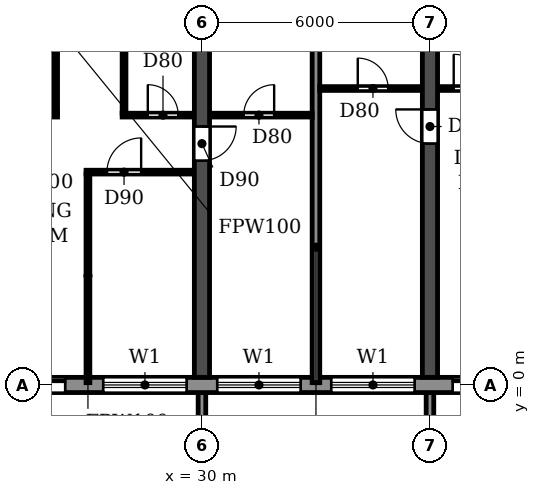
"""IFC4 building model, lengths in metres.
Left out: names, types, materials, properties, quantities, classifications, styles, units other than length and angle.
Written with IfcOpenShell. Run it as: python <this file> out.ifc"""

import sys

from ifc_helpers import new_model, si_unit, direction, frame, frame_2d, origin, place, context, subcontext, project, spatial, polyline, rectangle, outline, extrude, source, transform, mapped, element, fill, save


model = new_model("IFC4")
c1 = context("Model", 3, precision=1e-05, world=origin(), true_north=direction((0.0, 1.0)))
c2 = subcontext(c1, "Body", "Model", "MODEL_VIEW")
j1 = project(units=[si_unit("LENGTHUNIT", "METRE"), si_unit("PLANEANGLEUNIT", "RADIAN")], contexts=[c1])
p1 = place(None, origin())
s1 = spatial("IfcSite", under=j1, at=p1, CompositionType="ELEMENT")
p2 = place(p1, origin())
s2 = spatial("IfcBuilding", under=s1, at=p2, CompositionType="ELEMENT")
p3 = place(p2, frame((0.0, 0.0, 23.4)))
s3 = spatial("IfcBuildingStorey", under=s2, at=p3, CompositionType="ELEMENT", Elevation=23.4)
p4 = place(p3, frame((30.0, 0.2, 0.0), z_axis=(0.0, 0.0, 1.0), x_axis=(0.0, 1.0, 0.0)))
e1 = element("IfcWall", 1, at=p4, inside=s3, PredefinedType="SHEAR", context=c2, shape_type="SweptSolid", body=[
    extrude(rectangle(XDim=11.65, YDim=0.4, at=frame_2d((5.825, 0.0))), origin(), (0.0, 0.0, 1.0), 3.05),
])
p5 = place(p4, frame((5.7, 0.0, 0.0)))
e2 = element("IfcOpeningElement", 2, at=p5, cuts=e1, PredefinedType="OPENING", context=c2, shape_type="SweptSolid", body=[
    extrude(rectangle(XDim=0.9, YDim=2.1, at=frame_2d((0.45, 1.05))), frame((0.0, 0.21, 0.0), z_axis=(0.0, -1.0, 0.0), x_axis=(1.0, 0.0, 0.0)), (0.0, 0.0, 1.0), 0.42),
])
p6 = place(p3, frame((36.0, 0.2, 0.0), z_axis=(0.0, 0.0, 1.0), x_axis=(0.0, 1.0, 0.0)))
e3 = element("IfcWall", 3, at=p6, inside=s3, PredefinedType="SHEAR", context=c2, shape_type="SweptSolid", body=[
    extrude(rectangle(XDim=11.65, YDim=0.4, at=frame_2d((5.825, 0.0))), origin(), (0.0, 0.0, 1.0), 3.05),
])
p7 = place(p6, frame((6.15, 0.0, 0.0)))
e4 = element("IfcOpeningElement", 4, at=p7, cuts=e3, PredefinedType="OPENING", context=c2, shape_type="SweptSolid", body=[
    extrude(rectangle(XDim=0.9, YDim=2.1, at=frame_2d((0.45, 1.05))), frame((0.0, 0.21, 0.0), z_axis=(0.0, -1.0, 0.0), x_axis=(1.0, 0.0, 0.0)), (0.0, 0.0, 1.0), 0.42),
])
p8 = place(p3, frame((4.683, 0.0, 0.0), z_axis=(0.0, 0.0, 1.0), x_axis=(1.0, 0.0, 0.0)))
e5 = element("IfcWall", 5, at=p8, inside=s3, PredefinedType="STANDARD", context=c2, shape_type="SweptSolid", body=[
    extrude(rectangle(XDim=92.634, YDim=0.4, at=frame_2d((46.317, 0.0))), origin(), (0.0, 0.0, 1.0), 3.05),
])
p9 = place(p8, frame((1.717, 0.0, 0.9)))
e6 = element("IfcOpeningElement", 6, at=p9, cuts=e5, PredefinedType="OPENING", context=c2, shape_type="SweptSolid", body=[
    extrude(rectangle(XDim=2.2, YDim=1.5, at=frame_2d((1.1, 0.75))), frame((0.0, 0.21, 0.0), z_axis=(0.0, -1.0, 0.0), x_axis=(1.0, 0.0, 0.0)), (0.0, 0.0, 1.0), 0.42),
])
p10 = place(p8, frame((4.717, 0.0, 0.9)))
e7 = element("IfcOpeningElement", 7, at=p10, cuts=e5, PredefinedType="OPENING", context=c2, shape_type="SweptSolid", body=[
    extrude(rectangle(XDim=2.2, YDim=1.5, at=frame_2d((1.1, 0.75))), frame((0.0, 0.21, 0.0), z_axis=(0.0, -1.0, 0.0), x_axis=(1.0, 0.0, 0.0)), (0.0, 0.0, 1.0), 0.42),
])
p11 = place(p8, frame((7.717, 0.0, 0.9)))
e8 = element("IfcOpeningElement", 8, at=p11, cuts=e5, PredefinedType="OPENING", context=c2, shape_type="SweptSolid", body=[
    extrude(rectangle(XDim=2.2, YDim=1.5, at=frame_2d((1.1, 0.75))), frame((0.0, 0.21, 0.0), z_axis=(0.0, -1.0, 0.0), x_axis=(1.0, 0.0, 0.0)), (0.0, 0.0, 1.0), 0.42),
])
p12 = place(p8, frame((10.717, 0.0, 0.9)))
e9 = element("IfcOpeningElement", 9, at=p12, cuts=e5, PredefinedType="OPENING", context=c2, shape_type="SweptSolid", body=[
    extrude(rectangle(XDim=2.2, YDim=1.5, at=frame_2d((1.1, 0.75))), frame((0.0, 0.21, 0.0), z_axis=(0.0, -1.0, 0.0), x_axis=(1.0, 0.0, 0.0)), (0.0, 0.0, 1.0), 0.42),
])
p13 = place(p8, frame((13.717, 0.0, 0.9)))
e10 = element("IfcOpeningElement", 10, at=p13, cuts=e5, PredefinedType="OPENING", context=c2, shape_type="SweptSolid", body=[
    extrude(rectangle(XDim=2.2, YDim=1.5, at=frame_2d((1.1, 0.75))), frame((0.0, 0.21, 0.0), z_axis=(0.0, -1.0, 0.0), x_axis=(1.0, 0.0, 0.0)), (0.0, 0.0, 1.0), 0.42),
])
p14 = place(p8, frame((16.717, 0.0, 0.9)))
e11 = element("IfcOpeningElement", 11, at=p14, cuts=e5, PredefinedType="OPENING", context=c2, shape_type="SweptSolid", body=[
    extrude(rectangle(XDim=2.2, YDim=1.5, at=frame_2d((1.1, 0.75))), frame((0.0, 0.21, 0.0), z_axis=(0.0, -1.0, 0.0), x_axis=(1.0, 0.0, 0.0)), (0.0, 0.0, 1.0), 0.42),
])
p15 = place(p8, frame((19.917, 0.0, 0.0)))
e12 = element("IfcOpeningElement", 12, at=p15, cuts=e5, PredefinedType="OPENING", context=c2, shape_type="SweptSolid", body=[
    extrude(rectangle(XDim=1.8, YDim=2.4, at=frame_2d((0.9, 1.2))), frame((0.0, 0.21, 0.0), z_axis=(0.0, -1.0, 0.0), x_axis=(1.0, 0.0, 0.0)), (0.0, 0.0, 1.0), 0.42),
])
p16 = place(p8, frame((22.717, 0.0, 0.9)))
e13 = element("IfcOpeningElement", 13, at=p16, cuts=e5, PredefinedType="OPENING", context=c2, shape_type="SweptSolid", body=[
    extrude(rectangle(XDim=2.2, YDim=1.5, at=frame_2d((1.1, 0.75))), frame((0.0, 0.21, 0.0), z_axis=(0.0, -1.0, 0.0), x_axis=(1.0, 0.0, 0.0)), (0.0, 0.0, 1.0), 0.42),
])
p17 = place(p8, frame((25.717, 0.0, 0.9)))
e14 = element("IfcOpeningElement", 14, at=p17, cuts=e5, PredefinedType="OPENING", context=c2, shape_type="SweptSolid", body=[
    extrude(rectangle(XDim=2.2, YDim=1.5, at=frame_2d((1.1, 0.75))), frame((0.0, 0.21, 0.0), z_axis=(0.0, -1.0, 0.0), x_axis=(1.0, 0.0, 0.0)), (0.0, 0.0, 1.0), 0.42),
])
p18 = place(p8, frame((28.717, 0.0, 0.9)))
e15 = element("IfcOpeningElement", 15, at=p18, cuts=e5, PredefinedType="OPENING", context=c2, shape_type="SweptSolid", body=[
    extrude(rectangle(XDim=2.2, YDim=1.5, at=frame_2d((1.1, 0.75))), frame((0.0, 0.21, 0.0), z_axis=(0.0, -1.0, 0.0), x_axis=(1.0, 0.0, 0.0)), (0.0, 0.0, 1.0), 0.42),
])
p19 = place(p8, frame((31.917, 0.0, 0.0)))
e16 = element("IfcOpeningElement", 16, at=p19, cuts=e5, PredefinedType="OPENING", context=c2, shape_type="SweptSolid", body=[
    extrude(rectangle(XDim=1.8, YDim=2.4, at=frame_2d((0.9, 1.2))), frame((0.0, 0.21, 0.0), z_axis=(0.0, -1.0, 0.0), x_axis=(1.0, 0.0, 0.0)), (0.0, 0.0, 1.0), 0.42),
])
p20 = place(p8, frame((34.717, 0.0, 0.9)))
e17 = element("IfcOpeningElement", 17, at=p20, cuts=e5, PredefinedType="OPENING", context=c2, shape_type="SweptSolid", body=[
    extrude(rectangle(XDim=2.2, YDim=1.5, at=frame_2d((1.1, 0.75))), frame((0.0, 0.21, 0.0), z_axis=(0.0, -1.0, 0.0), x_axis=(1.0, 0.0, 0.0)), (0.0, 0.0, 1.0), 0.42),
])
p21 = place(p8, frame((37.717, 0.0, 0.9)))
e18 = element("IfcOpeningElement", 18, at=p21, cuts=e5, PredefinedType="OPENING", context=c2, shape_type="SweptSolid", body=[
    extrude(rectangle(XDim=2.2, YDim=1.5, at=frame_2d((1.1, 0.75))), frame((0.0, 0.21, 0.0), z_axis=(0.0, -1.0, 0.0), x_axis=(1.0, 0.0, 0.0)), (0.0, 0.0, 1.0), 0.42),
])
p22 = place(p8, frame((40.717, 0.0, 0.9)))
e19 = element("IfcOpeningElement", 19, at=p22, cuts=e5, PredefinedType="OPENING", context=c2, shape_type="SweptSolid", body=[
    extrude(rectangle(XDim=2.2, YDim=1.5, at=frame_2d((1.1, 0.75))), frame((0.0, 0.21, 0.0), z_axis=(0.0, -1.0, 0.0), x_axis=(1.0, 0.0, 0.0)), (0.0, 0.0, 1.0), 0.42),
])
p23 = place(p8, frame((43.917, 0.0, 0.0)))
e20 = element("IfcOpeningElement", 20, at=p23, cuts=e5, PredefinedType="OPENING", context=c2, shape_type="SweptSolid", body=[
    extrude(rectangle(XDim=1.8, YDim=2.4, at=frame_2d((0.9, 1.2))), frame((0.0, 0.21, 0.0), z_axis=(0.0, -1.0, 0.0), x_axis=(1.0, 0.0, 0.0)), (0.0, 0.0, 1.0), 0.42),
])
p24 = place(p8, frame((46.717, 0.0, 0.9)))
e21 = element("IfcOpeningElement", 21, at=p24, cuts=e5, PredefinedType="OPENING", context=c2, shape_type="SweptSolid", body=[
    extrude(rectangle(XDim=2.2, YDim=1.5, at=frame_2d((1.1, 0.75))), frame((0.0, 0.21, 0.0), z_axis=(0.0, -1.0, 0.0), x_axis=(1.0, 0.0, 0.0)), (0.0, 0.0, 1.0), 0.42),
])
p25 = place(p8, frame((49.717, 0.0, 0.9)))
e22 = element("IfcOpeningElement", 22, at=p25, cuts=e5, PredefinedType="OPENING", context=c2, shape_type="SweptSolid", body=[
    extrude(rectangle(XDim=2.2, YDim=1.5, at=frame_2d((1.1, 0.75))), frame((0.0, 0.21, 0.0), z_axis=(0.0, -1.0, 0.0), x_axis=(1.0, 0.0, 0.0)), (0.0, 0.0, 1.0), 0.42),
])
p26 = place(p8, frame((52.717, 0.0, 0.9)))
e23 = element("IfcOpeningElement", 23, at=p26, cuts=e5, PredefinedType="OPENING", context=c2, shape_type="SweptSolid", body=[
    extrude(rectangle(XDim=2.2, YDim=1.5, at=frame_2d((1.1, 0.75))), frame((0.0, 0.21, 0.0), z_axis=(0.0, -1.0, 0.0), x_axis=(1.0, 0.0, 0.0)), (0.0, 0.0, 1.0), 0.42),
])
p27 = place(p8, frame((55.717, 0.0, 0.9)))
e24 = element("IfcOpeningElement", 24, at=p27, cuts=e5, PredefinedType="OPENING", context=c2, shape_type="SweptSolid", body=[
    extrude(rectangle(XDim=2.2, YDim=1.5, at=frame_2d((1.1, 0.75))), frame((0.0, 0.21, 0.0), z_axis=(0.0, -1.0, 0.0), x_axis=(1.0, 0.0, 0.0)), (0.0, 0.0, 1.0), 0.42),
])
p28 = place(p8, frame((58.917, 0.0, 0.0)))
e25 = element("IfcOpeningElement", 25, at=p28, cuts=e5, PredefinedType="OPENING", context=c2, shape_type="SweptSolid", body=[
    extrude(rectangle(XDim=1.8, YDim=2.4, at=frame_2d((0.9, 1.2))), frame((0.0, 0.21, 0.0), z_axis=(0.0, -1.0, 0.0), x_axis=(1.0, 0.0, 0.0)), (0.0, 0.0, 1.0), 0.42),
])
p29 = place(p8, frame((61.717, 0.0, 0.9)))
e26 = element("IfcOpeningElement", 26, at=p29, cuts=e5, PredefinedType="OPENING", context=c2, shape_type="SweptSolid", body=[
    extrude(rectangle(XDim=2.2, YDim=1.5, at=frame_2d((1.1, 0.75))), frame((0.0, 0.21, 0.0), z_axis=(0.0, -1.0, 0.0), x_axis=(1.0, 0.0, 0.0)), (0.0, 0.0, 1.0), 0.42),
])
p30 = place(p8, frame((64.717, 0.0, 0.9)))
e27 = element("IfcOpeningElement", 27, at=p30, cuts=e5, PredefinedType="OPENING", context=c2, shape_type="SweptSolid", body=[
    extrude(rectangle(XDim=2.2, YDim=1.5, at=frame_2d((1.1, 0.75))), frame((0.0, 0.21, 0.0), z_axis=(0.0, -1.0, 0.0), x_axis=(1.0, 0.0, 0.0)), (0.0, 0.0, 1.0), 0.42),
])
p31 = place(p8, frame((67.717, 0.0, 0.9)))
e28 = element("IfcOpeningElement", 28, at=p31, cuts=e5, PredefinedType="OPENING", context=c2, shape_type="SweptSolid", body=[
    extrude(rectangle(XDim=2.2, YDim=1.5, at=frame_2d((1.1, 0.75))), frame((0.0, 0.21, 0.0), z_axis=(0.0, -1.0, 0.0), x_axis=(1.0, 0.0, 0.0)), (0.0, 0.0, 1.0), 0.42),
])
p32 = place(p8, frame((70.917, 0.0, 0.0)))
e29 = element("IfcOpeningElement", 29, at=p32, cuts=e5, PredefinedType="OPENING", context=c2, shape_type="SweptSolid", body=[
    extrude(rectangle(XDim=1.8, YDim=2.4, at=frame_2d((0.9, 1.2))), frame((0.0, 0.21, 0.0), z_axis=(0.0, -1.0, 0.0), x_axis=(1.0, 0.0, 0.0)), (0.0, 0.0, 1.0), 0.42),
])
p33 = place(p8, frame((73.717, 0.0, 0.9)))
e30 = element("IfcOpeningElement", 30, at=p33, cuts=e5, PredefinedType="OPENING", context=c2, shape_type="SweptSolid", body=[
    extrude(rectangle(XDim=2.2, YDim=1.5, at=frame_2d((1.1, 0.75))), frame((0.0, 0.21, 0.0), z_axis=(0.0, -1.0, 0.0), x_axis=(1.0, 0.0, 0.0)), (0.0, 0.0, 1.0), 0.42),
])
p34 = place(p8, frame((76.717, 0.0, 0.9)))
e31 = element("IfcOpeningElement", 31, at=p34, cuts=e5, PredefinedType="OPENING", context=c2, shape_type="SweptSolid", body=[
    extrude(rectangle(XDim=2.2, YDim=1.5, at=frame_2d((1.1, 0.75))), frame((0.0, 0.21, 0.0), z_axis=(0.0, -1.0, 0.0), x_axis=(1.0, 0.0, 0.0)), (0.0, 0.0, 1.0), 0.42),
])
p35 = place(p8, frame((79.717, 0.0, 0.9)))
e32 = element("IfcOpeningElement", 32, at=p35, cuts=e5, PredefinedType="OPENING", context=c2, shape_type="SweptSolid", body=[
    extrude(rectangle(XDim=2.2, YDim=1.5, at=frame_2d((1.1, 0.75))), frame((0.0, 0.21, 0.0), z_axis=(0.0, -1.0, 0.0), x_axis=(1.0, 0.0, 0.0)), (0.0, 0.0, 1.0), 0.42),
])
p36 = place(p8, frame((82.717, 0.0, 0.9)))
e33 = element("IfcOpeningElement", 33, at=p36, cuts=e5, PredefinedType="OPENING", context=c2, shape_type="SweptSolid", body=[
    extrude(rectangle(XDim=2.2, YDim=1.5, at=frame_2d((1.1, 0.75))), frame((0.0, 0.21, 0.0), z_axis=(0.0, -1.0, 0.0), x_axis=(1.0, 0.0, 0.0)), (0.0, 0.0, 1.0), 0.42),
])
p37 = place(p8, frame((85.717, 0.0, 0.9)))
e34 = element("IfcOpeningElement", 34, at=p37, cuts=e5, PredefinedType="OPENING", context=c2, shape_type="SweptSolid", body=[
    extrude(rectangle(XDim=2.2, YDim=1.5, at=frame_2d((1.1, 0.75))), frame((0.0, 0.21, 0.0), z_axis=(0.0, -1.0, 0.0), x_axis=(1.0, 0.0, 0.0)), (0.0, 0.0, 1.0), 0.42),
])
p38 = place(p8, frame((88.717, 0.0, 0.9)))
e35 = element("IfcOpeningElement", 35, at=p38, cuts=e5, PredefinedType="OPENING", context=c2, shape_type="SweptSolid", body=[
    extrude(rectangle(XDim=2.2, YDim=1.5, at=frame_2d((1.1, 0.75))), frame((0.0, 0.21, 0.0), z_axis=(0.0, -1.0, 0.0), x_axis=(1.0, 0.0, 0.0)), (0.0, 0.0, 1.0), 0.42),
])
m1 = source(origin(), c2, "Body", "SweptSolid", [
    extrude(outline(polyline([(0.0, 0.0), (0.2, 0.0), (0.2, 1.65), (0.0, 1.65), (0.0, 0.0)])), origin(), (0.0, 0.0, 1.0), 3.1),
])
for number, where in (
    (36, (29.9, -1.85, 0.0)),
    (37, (35.9, -1.85, 0.0)),
):
    element("IfcWall", number, at=place(p3, frame(where)), inside=s3, PredefinedType="STANDARD", context=c2, shape_type="MappedRepresentation", body=[
        mapped(m1, transform((0.0, 0.0, 0.0))),
    ])
p39 = place(p3, frame((33.0, 0.06, 0.0), z_axis=(0.0, 0.0, 1.0), x_axis=(0.0, 1.0, 0.0)))
e38 = element("IfcWall", 38, at=p39, inside=s3, PredefinedType="PARTITIONING", context=c2, shape_type="SweptSolid", body=[
    extrude(rectangle(XDim=11.78, YDim=0.2, at=frame_2d((5.89, 0.0))), origin(), (0.0, 0.0, 1.0), 3.05),
])
p40 = place(p3, frame((26.95, 5.6, 0.0), z_axis=(0.0, 0.0, 1.0), x_axis=(1.0, 0.0, 0.0)))
e39 = element("IfcWall", 39, at=p40, inside=s3, PredefinedType="PARTITIONING", context=c2, shape_type="SweptSolid", body=[
    extrude(rectangle(XDim=2.84, YDim=0.1, at=frame_2d((1.42, 0.0))), origin(), (0.0, 0.0, 1.0), 3.05),
])
p41 = place(p40, frame((0.55, 0.0, 0.0)))
e40 = element("IfcOpeningElement", 40, at=p41, cuts=e39, PredefinedType="OPENING", context=c2, shape_type="SweptSolid", body=[
    extrude(rectangle(XDim=0.9, YDim=2.1, at=frame_2d((0.45, 1.05))), frame((0.0, 0.06, 0.0), z_axis=(0.0, -1.0, 0.0), x_axis=(1.0, 0.0, 0.0)), (0.0, 0.0, 1.0), 0.12),
])
p42 = place(p3, frame((24.21, 7.1, 0.0), z_axis=(0.0, 0.0, 1.0), x_axis=(1.0, 0.0, 0.0)))
e41 = element("IfcWall", 41, at=p42, inside=s3, PredefinedType="PARTITIONING", context=c2, shape_type="SweptSolid", body=[
    extrude(rectangle(XDim=1.99, YDim=0.1, at=frame_2d((0.995, 0.0))), origin(), (0.0, 0.0, 1.0), 3.05),
])
p43 = place(p42, frame((0.415, 0.0, 0.0)))
e42 = element("IfcOpeningElement", 42, at=p43, cuts=e41, PredefinedType="OPENING", context=c2, shape_type="SweptSolid", body=[
    extrude(rectangle(XDim=0.9, YDim=2.1, at=frame_2d((0.45, 1.05))), frame((0.0, 0.06, 0.0), z_axis=(0.0, -1.0, 0.0), x_axis=(1.0, 0.0, 0.0)), (0.0, 0.0, 1.0), 0.12),
])
p44 = place(p3, frame((27.9, 7.1, 0.0), z_axis=(0.0, 0.0, 1.0), x_axis=(1.0, 0.0, 0.0)))
e43 = element("IfcWall", 43, at=p44, inside=s3, PredefinedType="PARTITIONING", context=c2, shape_type="SweptSolid", body=[
    extrude(rectangle(XDim=1.89, YDim=0.1, at=frame_2d((0.945, 0.0))), origin(), (0.0, 0.0, 1.0), 3.05),
])
p45 = place(p44, frame((0.675, 0.0, 0.0)))
e44 = element("IfcOpeningElement", 44, at=p45, cuts=e43, PredefinedType="OPENING", context=c2, shape_type="SweptSolid", body=[
    extrude(rectangle(XDim=0.8, YDim=2.1, at=frame_2d((0.4, 1.05))), frame((0.0, 0.06, 0.0), z_axis=(0.0, -1.0, 0.0), x_axis=(1.0, 0.0, 0.0)), (0.0, 0.0, 1.0), 0.12),
])
p46 = place(p3, frame((30.21, 7.1, 0.0), z_axis=(0.0, 0.0, 1.0), x_axis=(1.0, 0.0, 0.0)))
e45 = element("IfcWall", 45, at=p46, inside=s3, PredefinedType="PARTITIONING", context=c2, shape_type="SweptSolid", body=[
    extrude(rectangle(XDim=2.69, YDim=0.1, at=frame_2d((1.345, 0.0))), origin(), (0.0, 0.0, 1.0), 3.05),
])
p47 = place(p46, frame((0.89, 0.0, 0.0)))
e46 = element("IfcOpeningElement", 46, at=p47, cuts=e45, PredefinedType="OPENING", context=c2, shape_type="SweptSolid", body=[
    extrude(rectangle(XDim=0.8, YDim=2.1, at=frame_2d((0.4, 1.05))), frame((0.0, 0.06, 0.0), z_axis=(0.0, -1.0, 0.0), x_axis=(1.0, 0.0, 0.0)), (0.0, 0.0, 1.0), 0.12),
])
p48 = place(p3, frame((33.1, 7.8, 0.0), z_axis=(0.0, 0.0, 1.0), x_axis=(1.0, 0.0, 0.0)))
e47 = element("IfcWall", 47, at=p48, inside=s3, PredefinedType="PARTITIONING", context=c2, shape_type="SweptSolid", body=[
    extrude(rectangle(XDim=2.69, YDim=0.1, at=frame_2d((1.345, 0.0))), origin(), (0.0, 0.0, 1.0), 3.05),
])
p49 = place(p48, frame((1.0, 0.0, 0.0)))
e48 = element("IfcOpeningElement", 48, at=p49, cuts=e47, PredefinedType="OPENING", context=c2, shape_type="SweptSolid", body=[
    extrude(rectangle(XDim=0.8, YDim=2.1, at=frame_2d((0.4, 1.05))), frame((0.0, 0.06, 0.0), z_axis=(0.0, -1.0, 0.0), x_axis=(1.0, 0.0, 0.0)), (0.0, 0.0, 1.0), 0.12),
])
p50 = place(p3, frame((36.21, 7.8, 0.0), z_axis=(0.0, 0.0, 1.0), x_axis=(1.0, 0.0, 0.0)))
e49 = element("IfcWall", 49, at=p50, inside=s3, PredefinedType="PARTITIONING", context=c2, shape_type="SweptSolid", body=[
    extrude(rectangle(XDim=1.99, YDim=0.1, at=frame_2d((0.995, 0.0))), origin(), (0.0, 0.0, 1.0), 3.05),
])
p51 = place(p50, frame((0.415, 0.0, 0.0)))
e50 = element("IfcOpeningElement", 50, at=p51, cuts=e49, PredefinedType="OPENING", context=c2, shape_type="SweptSolid", body=[
    extrude(rectangle(XDim=0.9, YDim=2.1, at=frame_2d((0.45, 1.05))), frame((0.0, 0.06, 0.0), z_axis=(0.0, -1.0, 0.0), x_axis=(1.0, 0.0, 0.0)), (0.0, 0.0, 1.0), 0.12),
])
p52 = place(p3, frame((26.15, 7.15, 0.0), z_axis=(0.0, 0.0, 1.0), x_axis=(0.0, 1.0, 0.0)))
e51 = element("IfcWall", 51, at=p52, inside=s3, PredefinedType="PARTITIONING", context=c2, shape_type="SweptSolid", body=[
    extrude(rectangle(XDim=4.69, YDim=0.1, at=frame_2d((2.345, 0.0))), origin(), (0.0, 0.0, 1.0), 3.05),
])
p53 = place(p3, frame((27.0, 0.06, 0.0), z_axis=(0.0, 0.0, 1.0), x_axis=(0.0, 1.0, 0.0)))
e52 = element("IfcWall", 52, at=p53, inside=s3, PredefinedType="PARTITIONING", context=c2, shape_type="SweptSolid", body=[
    extrude(rectangle(XDim=5.49, YDim=0.1, at=frame_2d((2.745, 0.0))), origin(), (0.0, 0.0, 1.0), 3.05),
])
p54 = place(p3, frame((27.95, 7.15, 0.0), z_axis=(0.0, 0.0, 1.0), x_axis=(0.0, 1.0, 0.0)))
e53 = element("IfcWall", 53, at=p54, inside=s3, PredefinedType="PARTITIONING", context=c2, shape_type="SweptSolid", body=[
    extrude(rectangle(XDim=4.69, YDim=0.1, at=frame_2d((2.345, 0.0))), origin(), (0.0, 0.0, 1.0), 3.05),
])
p55 = place(p15, origin())
e54 = element("IfcDoor", 54, at=p55, inside=s3, OperationType="DOUBLE_DOOR_SLIDING", PredefinedType="DOOR", context=c2, shape_type="SweptSolid", body=[
    extrude(rectangle(XDim=1.8, YDim=2.4, at=frame_2d((0.9, 1.2))), frame((0.0, 0.025, 0.0), z_axis=(0.0, -1.0, 0.0), x_axis=(1.0, 0.0, 0.0)), (0.0, 0.0, 1.0), 0.05),
])
fill(e12, e54)
p56 = place(p16, origin())
e55 = element("IfcWindow", 55, at=p56, inside=s3, PartitioningType="DOUBLE_PANEL_HORIZONTAL", PredefinedType="WINDOW", context=c2, shape_type="SweptSolid", body=[
    extrude(rectangle(XDim=2.2, YDim=1.5, at=frame_2d((1.1, 0.75))), frame((0.0, 0.03, 0.0), z_axis=(0.0, -1.0, 0.0), x_axis=(1.0, 0.0, 0.0)), (0.0, 0.0, 1.0), 0.06),
])
fill(e13, e55)
p57 = place(p17, origin())
e56 = element("IfcWindow", 56, at=p57, inside=s3, PartitioningType="DOUBLE_PANEL_HORIZONTAL", PredefinedType="WINDOW", context=c2, shape_type="SweptSolid", body=[
    extrude(rectangle(XDim=2.2, YDim=1.5, at=frame_2d((1.1, 0.75))), frame((0.0, 0.03, 0.0), z_axis=(0.0, -1.0, 0.0), x_axis=(1.0, 0.0, 0.0)), (0.0, 0.0, 1.0), 0.06),
])
fill(e14, e56)
p58 = place(p18, origin())
e57 = element("IfcWindow", 57, at=p58, inside=s3, PartitioningType="DOUBLE_PANEL_HORIZONTAL", PredefinedType="WINDOW", context=c2, shape_type="SweptSolid", body=[
    extrude(rectangle(XDim=2.2, YDim=1.5, at=frame_2d((1.1, 0.75))), frame((0.0, 0.03, 0.0), z_axis=(0.0, -1.0, 0.0), x_axis=(1.0, 0.0, 0.0)), (0.0, 0.0, 1.0), 0.06),
])
fill(e15, e57)
p59 = place(p19, origin())
e58 = element("IfcDoor", 58, at=p59, inside=s3, OperationType="DOUBLE_DOOR_SLIDING", PredefinedType="DOOR", context=c2, shape_type="SweptSolid", body=[
    extrude(rectangle(XDim=1.8, YDim=2.4, at=frame_2d((0.9, 1.2))), frame((0.0, 0.025, 0.0), z_axis=(0.0, -1.0, 0.0), x_axis=(1.0, 0.0, 0.0)), (0.0, 0.0, 1.0), 0.05),
])
fill(e16, e58)
p60 = place(p47, origin())
e59 = element("IfcDoor", 59, at=p60, inside=s3, OperationType="SINGLE_SWING_RIGHT", PredefinedType="DOOR", context=c2, shape_type="SweptSolid", body=[
    extrude(rectangle(XDim=0.8, YDim=2.1, at=frame_2d((0.4, 1.05))), frame((0.0, 0.025, 0.0), z_axis=(0.0, -1.0, 0.0), x_axis=(1.0, 0.0, 0.0)), (0.0, 0.0, 1.0), 0.05),
])
fill(e46, e59)
p61 = place(p41, origin())
e60 = element("IfcDoor", 60, at=p61, inside=s3, OperationType="SINGLE_SWING_RIGHT", PredefinedType="DOOR", context=c2, shape_type="SweptSolid", body=[
    extrude(rectangle(XDim=0.9, YDim=2.1, at=frame_2d((0.45, 1.05))), frame((0.0, 0.025, 0.0), z_axis=(0.0, -1.0, 0.0), x_axis=(1.0, 0.0, 0.0)), (0.0, 0.0, 1.0), 0.05),
])
fill(e40, e60)
p62 = place(p45, origin())
e61 = element("IfcDoor", 61, at=p62, inside=s3, OperationType="SINGLE_SWING_LEFT", PredefinedType="DOOR", context=c2, shape_type="SweptSolid", body=[
    extrude(rectangle(XDim=0.8, YDim=2.1, at=frame_2d((0.4, 1.05))), frame((0.0, 0.025, 0.0), z_axis=(0.0, -1.0, 0.0), x_axis=(1.0, 0.0, 0.0)), (0.0, 0.0, 1.0), 0.05),
])
fill(e44, e61)
p63 = place(p5, frame((0.9, 0.0, 0.0), z_axis=(0.0, 0.0, 1.0), x_axis=(-1.0, 0.0, 0.0)))
e62 = element("IfcDoor", 62, at=p63, inside=s3, OperationType="SINGLE_SWING_LEFT", PredefinedType="DOOR", context=c2, shape_type="SweptSolid", body=[
    extrude(rectangle(XDim=0.9, YDim=2.1, at=frame_2d((0.45, 1.05))), frame((0.0, 0.025, 0.0), z_axis=(0.0, -1.0, 0.0), x_axis=(1.0, 0.0, 0.0)), (0.0, 0.0, 1.0), 0.05),
])
fill(e2, e62)
p64 = place(p49, origin())
e63 = element("IfcDoor", 63, at=p64, inside=s3, OperationType="SINGLE_SWING_LEFT", PredefinedType="DOOR", context=c2, shape_type="SweptSolid", body=[
    extrude(rectangle(XDim=0.8, YDim=2.1, at=frame_2d((0.4, 1.05))), frame((0.0, 0.025, 0.0), z_axis=(0.0, -1.0, 0.0), x_axis=(1.0, 0.0, 0.0)), (0.0, 0.0, 1.0), 0.05),
])
fill(e48, e63)
p65 = place(p7, origin())
e64 = element("IfcDoor", 64, at=p65, inside=s3, OperationType="SINGLE_SWING_RIGHT", PredefinedType="DOOR", context=c2, shape_type="SweptSolid", body=[
    extrude(rectangle(XDim=0.9, YDim=2.1, at=frame_2d((0.45, 1.05))), frame((0.0, 0.025, 0.0), z_axis=(0.0, -1.0, 0.0), x_axis=(1.0, 0.0, 0.0)), (0.0, 0.0, 1.0), 0.05),
])
fill(e4, e64)
p66 = place(p51, origin())
e65 = element("IfcDoor", 65, at=p66, inside=s3, OperationType="SINGLE_SWING_LEFT", PredefinedType="DOOR", context=c2, shape_type="SweptSolid", body=[
    extrude(rectangle(XDim=0.9, YDim=2.1, at=frame_2d((0.45, 1.05))), frame((0.0, 0.025, 0.0), z_axis=(0.0, -1.0, 0.0), x_axis=(1.0, 0.0, 0.0)), (0.0, 0.0, 1.0), 0.05),
])
fill(e50, e65)
save(model, sys.argv[1])
